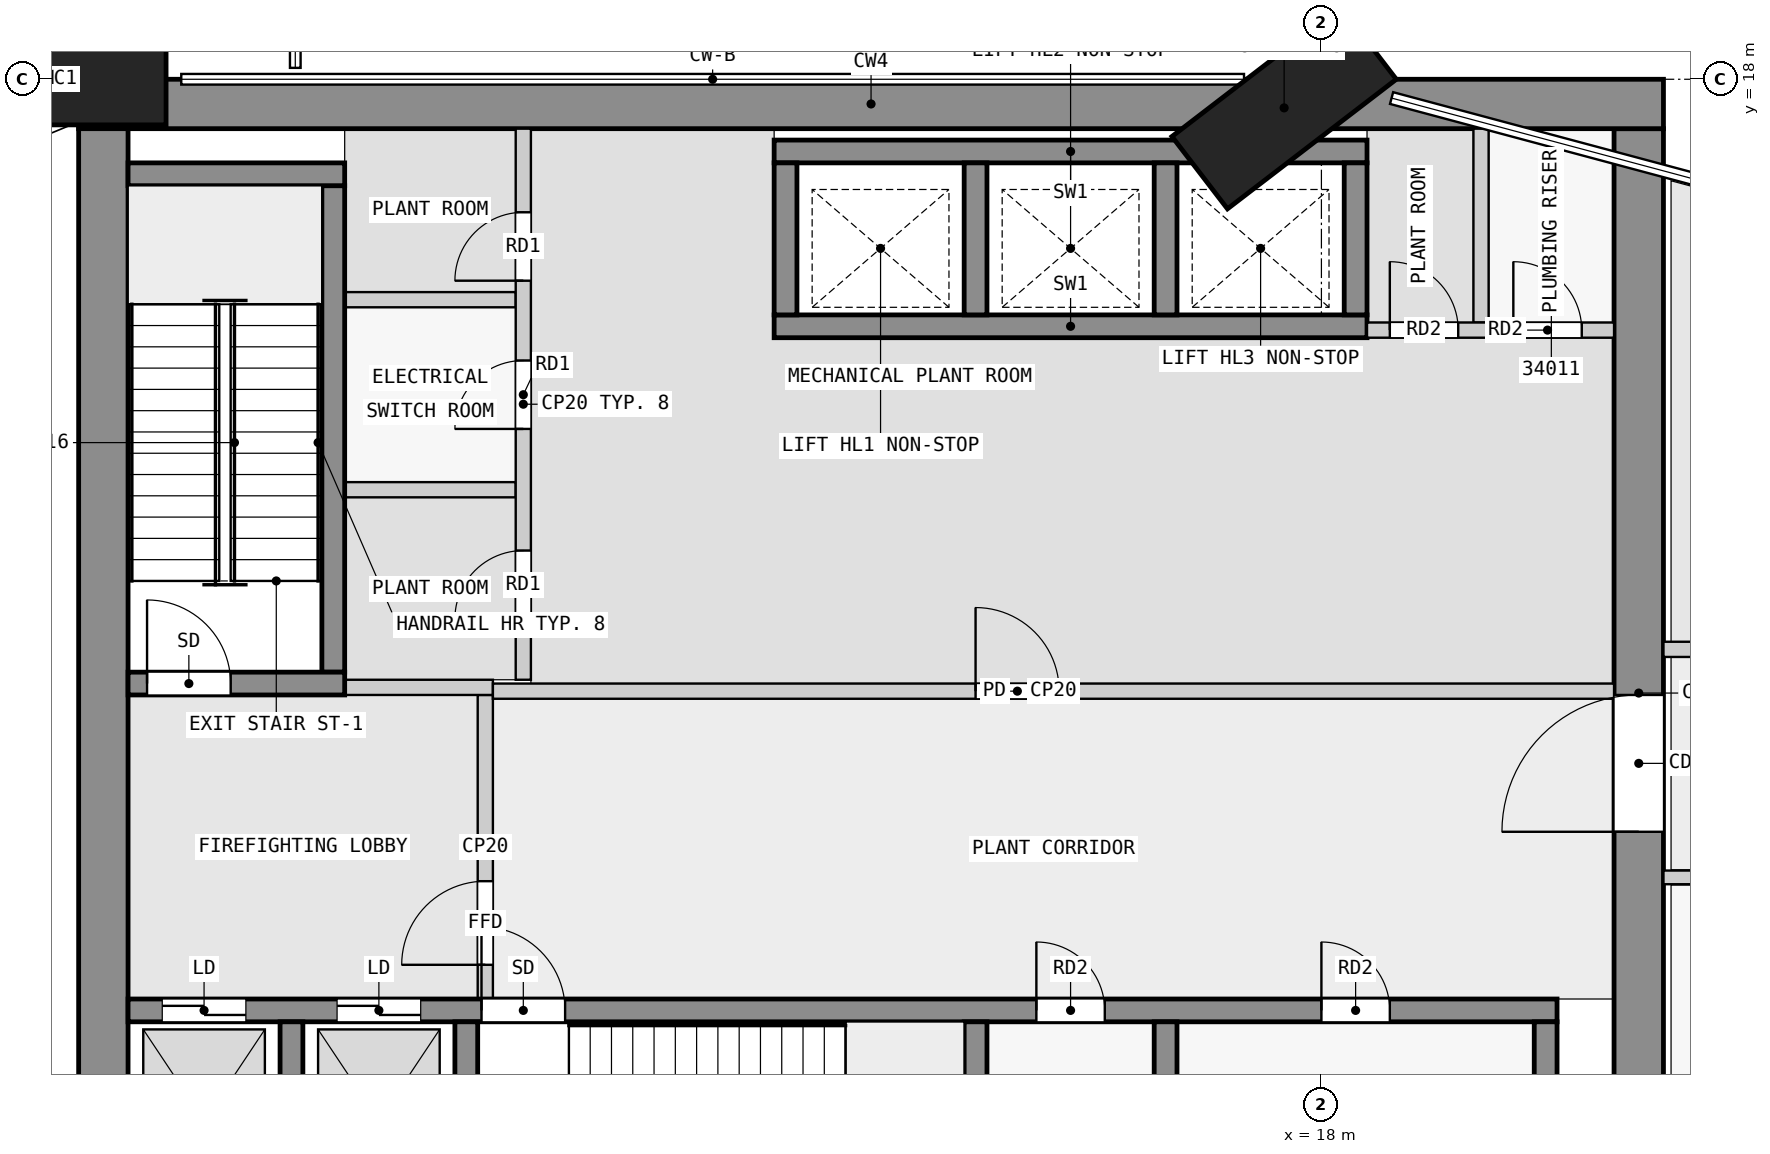
"""IFC4 building model, lengths in metres.
Left out: names, types, materials, properties, quantities, classifications, styles, units other than length and angle.
Written with IfcOpenShell. Run it as: python <this file> out.ifc"""

import sys

from ifc_helpers import new_model, si_unit, direction, frame, frame_2d, origin, origin_2d, place, context, subcontext, project, spatial, rectangle, extrude, element, fill, save


model = new_model("IFC4")
c1 = context("Model", 3, precision=1e-05, world=origin(), true_north=direction((0.0, 1.0)))
c2 = subcontext(c1, "Body", "Model", "MODEL_VIEW")
j1 = project(units=[si_unit("LENGTHUNIT", "METRE"), si_unit("PLANEANGLEUNIT", "RADIAN")], contexts=[c1])
p1 = place(None, origin())
s1 = spatial("IfcSite", under=j1, at=p1, CompositionType="ELEMENT")
p2 = place(p1, origin())
s2 = spatial("IfcBuilding", under=s1, at=p2, CompositionType="ELEMENT")
p3 = place(p2, frame((0.0, 0.0, 134.6)))
s3 = spatial("IfcBuildingStorey", under=s2, at=p3, CompositionType="ELEMENT", Elevation=134.6)
for number, where, z_axis, x_axis in (
    (1, (17.51, 17.624, 0.0), (0.0, 0.0, 1.0), (-0.609, 0.793, 0.0)),
    (2, (1.4, 18.0, 0.0), (0.0, 0.0, 1.0), (0.0, 1.0, 0.0)),
):
    element("IfcColumn", number, at=place(p3, frame(where, z_axis=z_axis, x_axis=x_axis)), inside=s3, PredefinedType="COLUMN", context=c2, shape_type="SweptSolid", body=[
        extrude(rectangle(XDim=1.2, YDim=2.8, at=origin_2d()), origin(), (0.0, 0.0, 1.0), 4.8),
    ])
p4 = place(p3, frame((1.65, 17.675, 0.0), z_axis=(0.0, 0.0, 1.0), x_axis=(1.0, 0.0, 0.0)))
e3 = element("IfcWall", 3, at=p4, inside=s3, PredefinedType="SHEAR", context=c2, shape_type="SweptSolid", body=[
    extrude(rectangle(XDim=20.85, YDim=0.65, at=frame_2d((10.425, 0.0))), origin(), (0.0, 0.0, 1.0), 4.3),
])
p5 = place(p3, frame((1.975, 2.5, 0.0), z_axis=(0.0, 0.0, 1.0), x_axis=(0.0, 1.0, 0.0)))
e4 = element("IfcWall", 4, at=p5, inside=s3, PredefinedType="SHEAR", context=c2, shape_type="SweptSolid", body=[
    extrude(rectangle(XDim=14.85, YDim=0.65, at=frame_2d((7.425, 0.0))), origin(), (0.0, 0.0, 1.0), 4.3),
])
p6 = place(p3, frame((22.175, 2.5, 0.0), z_axis=(0.0, 0.0, 1.0), x_axis=(0.0, 1.0, 0.0)))
e5 = element("IfcWall", 5, at=p6, inside=s3, PredefinedType="SHEAR", context=c2, shape_type="SweptSolid", body=[
    extrude(rectangle(XDim=14.85, YDim=0.65, at=frame_2d((7.425, 0.0))), origin(), (0.0, 0.0, 1.0), 4.3),
])
p7 = place(p6, frame((5.6, 0.0, 0.0)))
e6 = element("IfcOpeningElement", 6, at=p7, cuts=e5, PredefinedType="OPENING", context=c2, shape_type="SweptSolid", body=[
    extrude(rectangle(XDim=1.8, YDim=2.1, at=frame_2d((0.9, 1.05))), frame((0.0, 0.335, 0.0), z_axis=(0.0, -1.0, 0.0), x_axis=(1.0, 0.0, 0.0)), (0.0, 0.0, 1.0), 0.67),
])
for number, where, z_axis, x_axis in (
    (7, (4.45, 2.8, 0.0), (0.0, 0.0, 1.0), (0.0, 1.0, 0.0)),
    (8, (6.75, 2.8, 0.0), (0.0, 0.0, 1.0), (0.0, 1.0, 0.0)),
    (9, (13.45, 2.8, 0.0), (0.0, 0.0, 1.0), (0.0, 1.0, 0.0)),
    (10, (15.95, 2.8, 0.0), (0.0, 0.0, 1.0), (0.0, 1.0, 0.0)),
    (11, (20.95, 2.8, 0.0), (0.0, 0.0, 1.0), (0.0, 1.0, 0.0)),
):
    element("IfcWall", number, at=place(p3, frame(where, z_axis=z_axis, x_axis=x_axis)), inside=s3, PredefinedType="SHEAR", context=c2, shape_type="SweptSolid", body=[
        extrude(rectangle(XDim=2.8, YDim=0.3, at=frame_2d((1.4, 0.0))), origin(), (0.0, 0.0, 1.0), 4.3),
    ])
p8 = place(p3, frame((2.3, 5.75, 0.0), z_axis=(0.0, 0.0, 1.0), x_axis=(1.0, 0.0, 0.0)))
e12 = element("IfcWall", 12, at=p8, inside=s3, PredefinedType="SHEAR", context=c2, shape_type="SweptSolid", body=[
    extrude(rectangle(XDim=18.8, YDim=0.3, at=frame_2d((9.4, 0.0))), origin(), (0.0, 0.0, 1.0), 4.3),
])
p9 = place(p8, frame((4.65, 0.0, 0.0)))
e13 = element("IfcOpeningElement", 13, at=p9, cuts=e12, PredefinedType="OPENING", context=c2, shape_type="SweptSolid", body=[
    extrude(rectangle(XDim=1.1, YDim=2.1, at=frame_2d((0.55, 1.05))), frame((0.0, 0.16, 0.0), z_axis=(0.0, -1.0, 0.0), x_axis=(1.0, 0.0, 0.0)), (0.0, 0.0, 1.0), 0.32),
])
p10 = place(p8, frame((0.45, 0.0, 0.0)))
e14 = element("IfcOpeningElement", 14, at=p10, cuts=e12, PredefinedType="OPENING", context=c2, shape_type="SweptSolid", body=[
    extrude(rectangle(XDim=1.1, YDim=2.1, at=frame_2d((0.55, 1.05))), frame((0.0, 0.16, 0.0), z_axis=(0.0, -1.0, 0.0), x_axis=(1.0, 0.0, 0.0)), (0.0, 0.0, 1.0), 0.32),
])
p11 = place(p8, frame((2.75, 0.0, 0.0)))
e15 = element("IfcOpeningElement", 15, at=p11, cuts=e12, PredefinedType="OPENING", context=c2, shape_type="SweptSolid", body=[
    extrude(rectangle(XDim=1.1, YDim=2.1, at=frame_2d((0.55, 1.05))), frame((0.0, 0.16, 0.0), z_axis=(0.0, -1.0, 0.0), x_axis=(1.0, 0.0, 0.0)), (0.0, 0.0, 1.0), 0.32),
])
p12 = place(p8, frame((11.95, 0.0, 0.0)))
e16 = element("IfcOpeningElement", 16, at=p12, cuts=e12, PredefinedType="OPENING", context=c2, shape_type="SweptSolid", body=[
    extrude(rectangle(XDim=0.9, YDim=2.1, at=frame_2d((0.45, 1.05))), frame((0.0, 0.16, 0.0), z_axis=(0.0, -1.0, 0.0), x_axis=(1.0, 0.0, 0.0)), (0.0, 0.0, 1.0), 0.32),
])
p13 = place(p8, frame((15.7, 0.0, 0.0)))
e17 = element("IfcOpeningElement", 17, at=p13, cuts=e12, PredefinedType="OPENING", context=c2, shape_type="SweptSolid", body=[
    extrude(rectangle(XDim=0.9, YDim=2.1, at=frame_2d((0.45, 1.05))), frame((0.0, 0.16, 0.0), z_axis=(0.0, -1.0, 0.0), x_axis=(1.0, 0.0, 0.0)), (0.0, 0.0, 1.0), 0.32),
])
p14 = place(p3, frame((2.3, 10.05, 0.0), z_axis=(0.0, 0.0, 1.0), x_axis=(1.0, 0.0, 0.0)))
e18 = element("IfcWall", 18, at=p14, inside=s3, PredefinedType="SHEAR", context=c2, shape_type="SweptSolid", body=[
    extrude(rectangle(XDim=2.85, YDim=0.3, at=frame_2d((1.425, 0.0))), origin(), (0.0, 0.0, 1.0), 4.3),
])
p15 = place(p14, frame((0.25, 0.0, 0.0)))
e19 = element("IfcOpeningElement", 19, at=p15, cuts=e18, PredefinedType="OPENING", context=c2, shape_type="SweptSolid", body=[
    extrude(rectangle(XDim=1.1, YDim=2.1, at=frame_2d((0.55, 1.05))), frame((0.0, 0.16, 0.0), z_axis=(0.0, -1.0, 0.0), x_axis=(1.0, 0.0, 0.0)), (0.0, 0.0, 1.0), 0.32),
])
p16 = place(p3, frame((5.0, 10.2, 0.0), z_axis=(0.0, 0.0, 1.0), x_axis=(0.0, 1.0, 0.0)))
e20 = element("IfcWall", 20, at=p16, inside=s3, PredefinedType="SHEAR", context=c2, shape_type="SweptSolid", body=[
    extrude(rectangle(XDim=6.4, YDim=0.3, at=frame_2d((3.2, 0.0))), origin(), (0.0, 0.0, 1.0), 4.3),
])
p17 = place(p3, frame((2.3, 16.75, 0.0), z_axis=(0.0, 0.0, 1.0), x_axis=(1.0, 0.0, 0.0)))
e21 = element("IfcWall", 21, at=p17, inside=s3, PredefinedType="SHEAR", context=c2, shape_type="SweptSolid", body=[
    extrude(rectangle(XDim=2.85, YDim=0.3, at=frame_2d((1.425, 0.0))), origin(), (0.0, 0.0, 1.0), 4.3),
])
for number, where, z_axis, x_axis in (
    (22, (10.8, 17.05, 0.0), (0.0, 0.0, 1.0), (1.0, 0.0, 0.0)),
    (23, (10.8, 14.75, 0.0), (0.0, 0.0, 1.0), (1.0, 0.0, 0.0)),
):
    element("IfcWall", number, at=place(p3, frame(where, z_axis=z_axis, x_axis=x_axis)), inside=s3, PredefinedType="SHEAR", context=c2, shape_type="SweptSolid", body=[
        extrude(rectangle(XDim=7.8, YDim=0.3, at=frame_2d((3.9, 0.0))), origin(), (0.0, 0.0, 1.0), 4.3),
    ])
for number, where, z_axis, x_axis in (
    (24, (10.95, 14.9, 0.0), (0.0, 0.0, 1.0), (0.0, 1.0, 0.0)),
    (25, (13.45, 14.9, 0.0), (0.0, 0.0, 1.0), (0.0, 1.0, 0.0)),
    (26, (15.95, 14.9, 0.0), (0.0, 0.0, 1.0), (0.0, 1.0, 0.0)),
    (27, (18.45, 14.9, 0.0), (0.0, 0.0, 1.0), (0.0, 1.0, 0.0)),
):
    element("IfcWall", number, at=place(p3, frame(where, z_axis=z_axis, x_axis=x_axis)), inside=s3, PredefinedType="SHEAR", context=c2, shape_type="SweptSolid", body=[
        extrude(rectangle(XDim=2.0, YDim=0.3, at=frame_2d((1.0, 0.0))), origin(), (0.0, 0.0, 1.0), 4.3),
    ])
p18 = place(p3, frame((7.0, 5.9, 0.0), z_axis=(0.0, 0.0, 1.0), x_axis=(0.0, 1.0, 0.0)))
e28 = element("IfcWall", 28, at=p18, inside=s3, PredefinedType="PARTITIONING", context=c2, shape_type="SweptSolid", body=[
    extrude(rectangle(XDim=4.0, YDim=0.2, at=frame_2d((2.0, 0.0))), origin(), (0.0, 0.0, 1.0), 4.3),
])
p19 = place(p18, frame((0.45, 0.0, 0.0)))
e29 = element("IfcOpeningElement", 29, at=p19, cuts=e28, PredefinedType="OPENING", context=c2, shape_type="SweptSolid", body=[
    extrude(rectangle(XDim=1.1, YDim=2.1, at=frame_2d((0.55, 1.05))), frame((0.0, 0.11, 0.0), z_axis=(0.0, -1.0, 0.0), x_axis=(1.0, 0.0, 0.0)), (0.0, 0.0, 1.0), 0.22),
])
p20 = place(p3, frame((5.15, 10.0, 0.0), z_axis=(0.0, 0.0, 1.0), x_axis=(1.0, 0.0, 0.0)))
e30 = element("IfcWall", 30, at=p20, inside=s3, PredefinedType="PARTITIONING", context=c2, shape_type="SweptSolid", body=[
    extrude(rectangle(XDim=1.95, YDim=0.2, at=frame_2d((0.975, 0.0))), origin(), (0.0, 0.0, 1.0), 4.3),
])
p21 = place(p3, frame((7.1, 9.95, 0.0), z_axis=(0.0, 0.0, 1.0), x_axis=(1.0, 0.0, 0.0)))
e31 = element("IfcWall", 31, at=p21, inside=s3, PredefinedType="PARTITIONING", context=c2, shape_type="SweptSolid", body=[
    extrude(rectangle(XDim=14.75, YDim=0.2, at=frame_2d((7.375, 0.0))), origin(), (0.0, 0.0, 1.0), 4.3),
])
p22 = place(p21, frame((6.35, 0.0, 0.0)))
e32 = element("IfcOpeningElement", 32, at=p22, cuts=e31, PredefinedType="OPENING", context=c2, shape_type="SweptSolid", body=[
    extrude(rectangle(XDim=1.1, YDim=2.1, at=frame_2d((0.55, 1.05))), frame((0.0, 0.11, 0.0), z_axis=(0.0, -1.0, 0.0), x_axis=(1.0, 0.0, 0.0)), (0.0, 0.0, 1.0), 0.22),
])
p23 = place(p3, frame((7.5, 10.1, 0.0), z_axis=(0.0, 0.0, 1.0), x_axis=(0.0, 1.0, 0.0)))
e33 = element("IfcWall", 33, at=p23, inside=s3, PredefinedType="PARTITIONING", context=c2, shape_type="SweptSolid", body=[
    extrude(rectangle(XDim=7.25, YDim=0.2, at=frame_2d((3.625, 0.0))), origin(), (0.0, 0.0, 1.0), 4.3),
])
p24 = place(p23, frame((0.8, 0.0, 0.0)))
e34 = element("IfcOpeningElement", 34, at=p24, cuts=e33, PredefinedType="OPENING", context=c2, shape_type="SweptSolid", body=[
    extrude(rectangle(XDim=0.9, YDim=2.1, at=frame_2d((0.45, 1.05))), frame((0.0, 0.11, 0.0), z_axis=(0.0, -1.0, 0.0), x_axis=(1.0, 0.0, 0.0)), (0.0, 0.0, 1.0), 0.22),
])
p25 = place(p23, frame((3.3, 0.0, 0.0)))
e35 = element("IfcOpeningElement", 35, at=p25, cuts=e33, PredefinedType="OPENING", context=c2, shape_type="SweptSolid", body=[
    extrude(rectangle(XDim=0.9, YDim=2.1, at=frame_2d((0.45, 1.05))), frame((0.0, 0.11, 0.0), z_axis=(0.0, -1.0, 0.0), x_axis=(1.0, 0.0, 0.0)), (0.0, 0.0, 1.0), 0.22),
])
p26 = place(p23, frame((5.25, 0.0, 0.0)))
e36 = element("IfcOpeningElement", 36, at=p26, cuts=e33, PredefinedType="OPENING", context=c2, shape_type="SweptSolid", body=[
    extrude(rectangle(XDim=0.9, YDim=2.1, at=frame_2d((0.45, 1.05))), frame((0.0, 0.11, 0.0), z_axis=(0.0, -1.0, 0.0), x_axis=(1.0, 0.0, 0.0)), (0.0, 0.0, 1.0), 0.22),
])
for number, where, z_axis, x_axis in (
    (37, (5.15, 12.6, 0.0), (0.0, 0.0, 1.0), (1.0, 0.0, 0.0)),
    (38, (5.15, 15.1, 0.0), (0.0, 0.0, 1.0), (1.0, 0.0, 0.0)),
):
    element("IfcWall", number, at=place(p3, frame(where, z_axis=z_axis, x_axis=x_axis)), inside=s3, PredefinedType="PARTITIONING", context=c2, shape_type="SweptSolid", body=[
        extrude(rectangle(XDim=2.25, YDim=0.2, at=frame_2d((1.125, 0.0))), origin(), (0.0, 0.0, 1.0), 4.3),
    ])
p27 = place(p3, frame((18.6, 14.7, 0.0), z_axis=(0.0, 0.0, 1.0), x_axis=(1.0, 0.0, 0.0)))
e39 = element("IfcWall", 39, at=p27, inside=s3, PredefinedType="PARTITIONING", context=c2, shape_type="SweptSolid", body=[
    extrude(rectangle(XDim=3.25, YDim=0.2, at=frame_2d((1.625, 0.0))), origin(), (0.0, 0.0, 1.0), 4.3),
])
p28 = place(p27, frame((0.3, 0.0, 0.0)))
e40 = element("IfcOpeningElement", 40, at=p28, cuts=e39, PredefinedType="OPENING", context=c2, shape_type="SweptSolid", body=[
    extrude(rectangle(XDim=0.9, YDim=2.1, at=frame_2d((0.45, 1.05))), frame((0.0, 0.11, 0.0), z_axis=(0.0, -1.0, 0.0), x_axis=(1.0, 0.0, 0.0)), (0.0, 0.0, 1.0), 0.22),
])
p29 = place(p27, frame((1.925, 0.0, 0.0)))
e41 = element("IfcOpeningElement", 41, at=p29, cuts=e39, PredefinedType="OPENING", context=c2, shape_type="SweptSolid", body=[
    extrude(rectangle(XDim=0.9, YDim=2.1, at=frame_2d((0.45, 1.05))), frame((0.0, 0.11, 0.0), z_axis=(0.0, -1.0, 0.0), x_axis=(1.0, 0.0, 0.0)), (0.0, 0.0, 1.0), 0.22),
])
p30 = place(p3, frame((20.1, 14.8, 0.0), z_axis=(0.0, 0.0, 1.0), x_axis=(0.0, 1.0, 0.0)))
e42 = element("IfcWall", 42, at=p30, inside=s3, PredefinedType="PARTITIONING", context=c2, shape_type="SweptSolid", body=[
    extrude(rectangle(XDim=2.55, YDim=0.2, at=frame_2d((1.275, 0.0))), origin(), (0.0, 0.0, 1.0), 4.3),
])
p31 = place(p3, frame((22.5, 10.5, 0.0), z_axis=(0.0, 0.0, 1.0), x_axis=(1.0, 0.0, 0.0)))
e43 = element("IfcWall", 43, at=p31, inside=s3, PredefinedType="PARTITIONING", context=c2, shape_type="SweptSolid", body=[
    extrude(rectangle(XDim=13.5, YDim=0.2, at=frame_2d((6.75, 0.0))), origin(), (0.0, 0.0, 1.0), 4.3),
])
p32 = place(p31, frame((6.1, 0.0, 0.0)))
e44 = element("IfcOpeningElement", 44, at=p32, cuts=e43, PredefinedType="OPENING", context=c2, shape_type="SweptSolid", body=[
    extrude(rectangle(XDim=1.1, YDim=2.1, at=frame_2d((0.55, 1.05))), frame((0.0, 0.11, 0.0), z_axis=(0.0, -1.0, 0.0), x_axis=(1.0, 0.0, 0.0)), (0.0, 0.0, 1.0), 0.22),
])
p33 = place(p3, frame((31.5, 7.5, 0.0), z_axis=(0.0, 0.0, 1.0), x_axis=(-1.0, 0.0, 0.0)))
e45 = element("IfcWall", 45, at=p33, inside=s3, PredefinedType="PARTITIONING", context=c2, shape_type="SweptSolid", body=[
    extrude(rectangle(XDim=9.0, YDim=0.18, at=frame_2d((4.5, 0.0))), origin(), (0.0, 0.0, 1.0), 4.3),
])
p34 = place(p33, frame((3.6, 0.0, 0.0)))
e46 = element("IfcOpeningElement", 46, at=p34, cuts=e45, PredefinedType="OPENING", context=c2, shape_type="SweptSolid", body=[
    extrude(rectangle(XDim=1.6, YDim=2.4, at=frame_2d((0.8, 1.2))), frame((0.0, 0.1, 0.0), z_axis=(0.0, -1.0, 0.0), x_axis=(1.0, 0.0, 0.0)), (0.0, 0.0, 1.0), 0.2),
])
p35 = place(p19, origin())
e47 = element("IfcDoor", 47, at=p35, inside=s3, OperationType="SINGLE_SWING_LEFT", PredefinedType="DOOR", context=c2, shape_type="SweptSolid", body=[
    extrude(rectangle(XDim=1.1, YDim=2.1, at=frame_2d((0.55, 1.05))), frame((0.0, 0.025, 0.0), z_axis=(0.0, -1.0, 0.0), x_axis=(1.0, 0.0, 0.0)), (0.0, 0.0, 1.0), 0.05),
])
fill(e29, e47)
p36 = place(p15, origin())
e48 = element("IfcDoor", 48, at=p36, inside=s3, OperationType="SINGLE_SWING_RIGHT", PredefinedType="DOOR", context=c2, shape_type="SweptSolid", body=[
    extrude(rectangle(XDim=1.1, YDim=2.1, at=frame_2d((0.55, 1.05))), frame((0.0, 0.025, 0.0), z_axis=(0.0, -1.0, 0.0), x_axis=(1.0, 0.0, 0.0)), (0.0, 0.0, 1.0), 0.05),
])
fill(e19, e48)
p37 = place(p22, origin())
e49 = element("IfcDoor", 49, at=p37, inside=s3, OperationType="SINGLE_SWING_LEFT", PredefinedType="DOOR", context=c2, shape_type="SweptSolid", body=[
    extrude(rectangle(XDim=1.1, YDim=2.1, at=frame_2d((0.55, 1.05))), frame((0.0, 0.025, 0.0), z_axis=(0.0, -1.0, 0.0), x_axis=(1.0, 0.0, 0.0)), (0.0, 0.0, 1.0), 0.05),
])
fill(e32, e49)
p38 = place(p9, origin())
e50 = element("IfcDoor", 50, at=p38, inside=s3, OperationType="SINGLE_SWING_LEFT", PredefinedType="DOOR", context=c2, shape_type="SweptSolid", body=[
    extrude(rectangle(XDim=1.1, YDim=2.1, at=frame_2d((0.55, 1.05))), frame((0.0, 0.025, 0.0), z_axis=(0.0, -1.0, 0.0), x_axis=(1.0, 0.0, 0.0)), (0.0, 0.0, 1.0), 0.05),
])
fill(e13, e50)
p39 = place(p10, origin())
e51 = element("IfcDoor", 51, at=p39, inside=s3, OperationType="DOUBLE_DOOR_SLIDING", PredefinedType="DOOR", context=c2, shape_type="SweptSolid", body=[
    extrude(rectangle(XDim=1.1, YDim=2.1, at=frame_2d((0.55, 1.05))), frame((0.0, 0.025, 0.0), z_axis=(0.0, -1.0, 0.0), x_axis=(1.0, 0.0, 0.0)), (0.0, 0.0, 1.0), 0.05),
])
fill(e14, e51)
p40 = place(p11, origin())
e52 = element("IfcDoor", 52, at=p40, inside=s3, OperationType="DOUBLE_DOOR_SLIDING", PredefinedType="DOOR", context=c2, shape_type="SweptSolid", body=[
    extrude(rectangle(XDim=1.1, YDim=2.1, at=frame_2d((0.55, 1.05))), frame((0.0, 0.025, 0.0), z_axis=(0.0, -1.0, 0.0), x_axis=(1.0, 0.0, 0.0)), (0.0, 0.0, 1.0), 0.05),
])
fill(e15, e52)
p41 = place(p7, origin())
e53 = element("IfcDoor", 53, at=p41, inside=s3, OperationType="DOUBLE_DOOR_SINGLE_SWING", PredefinedType="DOOR", context=c2, shape_type="SweptSolid", body=[
    extrude(rectangle(XDim=1.8, YDim=2.1, at=frame_2d((0.9, 1.05))), frame((0.0, 0.025, 0.0), z_axis=(0.0, -1.0, 0.0), x_axis=(1.0, 0.0, 0.0)), (0.0, 0.0, 1.0), 0.05),
])
fill(e6, e53)
p42 = place(p24, origin())
e54 = element("IfcDoor", 54, at=p42, inside=s3, OperationType="SINGLE_SWING_RIGHT", PredefinedType="DOOR", context=c2, shape_type="SweptSolid", body=[
    extrude(rectangle(XDim=0.9, YDim=2.1, at=frame_2d((0.45, 1.05))), frame((0.0, 0.025, 0.0), z_axis=(0.0, -1.0, 0.0), x_axis=(1.0, 0.0, 0.0)), (0.0, 0.0, 1.0), 0.05),
])
fill(e34, e54)
p43 = place(p25, origin())
e55 = element("IfcDoor", 55, at=p43, inside=s3, OperationType="SINGLE_SWING_RIGHT", PredefinedType="DOOR", context=c2, shape_type="SweptSolid", body=[
    extrude(rectangle(XDim=0.9, YDim=2.1, at=frame_2d((0.45, 1.05))), frame((0.0, 0.025, 0.0), z_axis=(0.0, -1.0, 0.0), x_axis=(1.0, 0.0, 0.0)), (0.0, 0.0, 1.0), 0.05),
])
fill(e35, e55)
p44 = place(p26, origin())
e56 = element("IfcDoor", 56, at=p44, inside=s3, OperationType="SINGLE_SWING_RIGHT", PredefinedType="DOOR", context=c2, shape_type="SweptSolid", body=[
    extrude(rectangle(XDim=0.9, YDim=2.1, at=frame_2d((0.45, 1.05))), frame((0.0, 0.025, 0.0), z_axis=(0.0, -1.0, 0.0), x_axis=(1.0, 0.0, 0.0)), (0.0, 0.0, 1.0), 0.05),
])
fill(e36, e56)
p45 = place(p28, origin())
e57 = element("IfcDoor", 57, at=p45, inside=s3, OperationType="SINGLE_SWING_LEFT", PredefinedType="DOOR", context=c2, shape_type="SweptSolid", body=[
    extrude(rectangle(XDim=0.9, YDim=2.1, at=frame_2d((0.45, 1.05))), frame((0.0, 0.025, 0.0), z_axis=(0.0, -1.0, 0.0), x_axis=(1.0, 0.0, 0.0)), (0.0, 0.0, 1.0), 0.05),
])
fill(e40, e57)
p46 = place(p29, origin())
e58 = element("IfcDoor", 58, at=p46, inside=s3, OperationType="SINGLE_SWING_LEFT", PredefinedType="DOOR", context=c2, shape_type="SweptSolid", body=[
    extrude(rectangle(XDim=0.9, YDim=2.1, at=frame_2d((0.45, 1.05))), frame((0.0, 0.025, 0.0), z_axis=(0.0, -1.0, 0.0), x_axis=(1.0, 0.0, 0.0)), (0.0, 0.0, 1.0), 0.05),
])
fill(e41, e58)
p47 = place(p12, origin())
e59 = element("IfcDoor", 59, at=p47, inside=s3, OperationType="SINGLE_SWING_LEFT", PredefinedType="DOOR", context=c2, shape_type="SweptSolid", body=[
    extrude(rectangle(XDim=0.9, YDim=2.1, at=frame_2d((0.45, 1.05))), frame((0.0, 0.025, 0.0), z_axis=(0.0, -1.0, 0.0), x_axis=(1.0, 0.0, 0.0)), (0.0, 0.0, 1.0), 0.05),
])
fill(e16, e59)
p48 = place(p13, origin())
e60 = element("IfcDoor", 60, at=p48, inside=s3, OperationType="SINGLE_SWING_LEFT", PredefinedType="DOOR", context=c2, shape_type="SweptSolid", body=[
    extrude(rectangle(XDim=0.9, YDim=2.1, at=frame_2d((0.45, 1.05))), frame((0.0, 0.025, 0.0), z_axis=(0.0, -1.0, 0.0), x_axis=(1.0, 0.0, 0.0)), (0.0, 0.0, 1.0), 0.05),
])
fill(e17, e60)
save(model, sys.argv[1])
